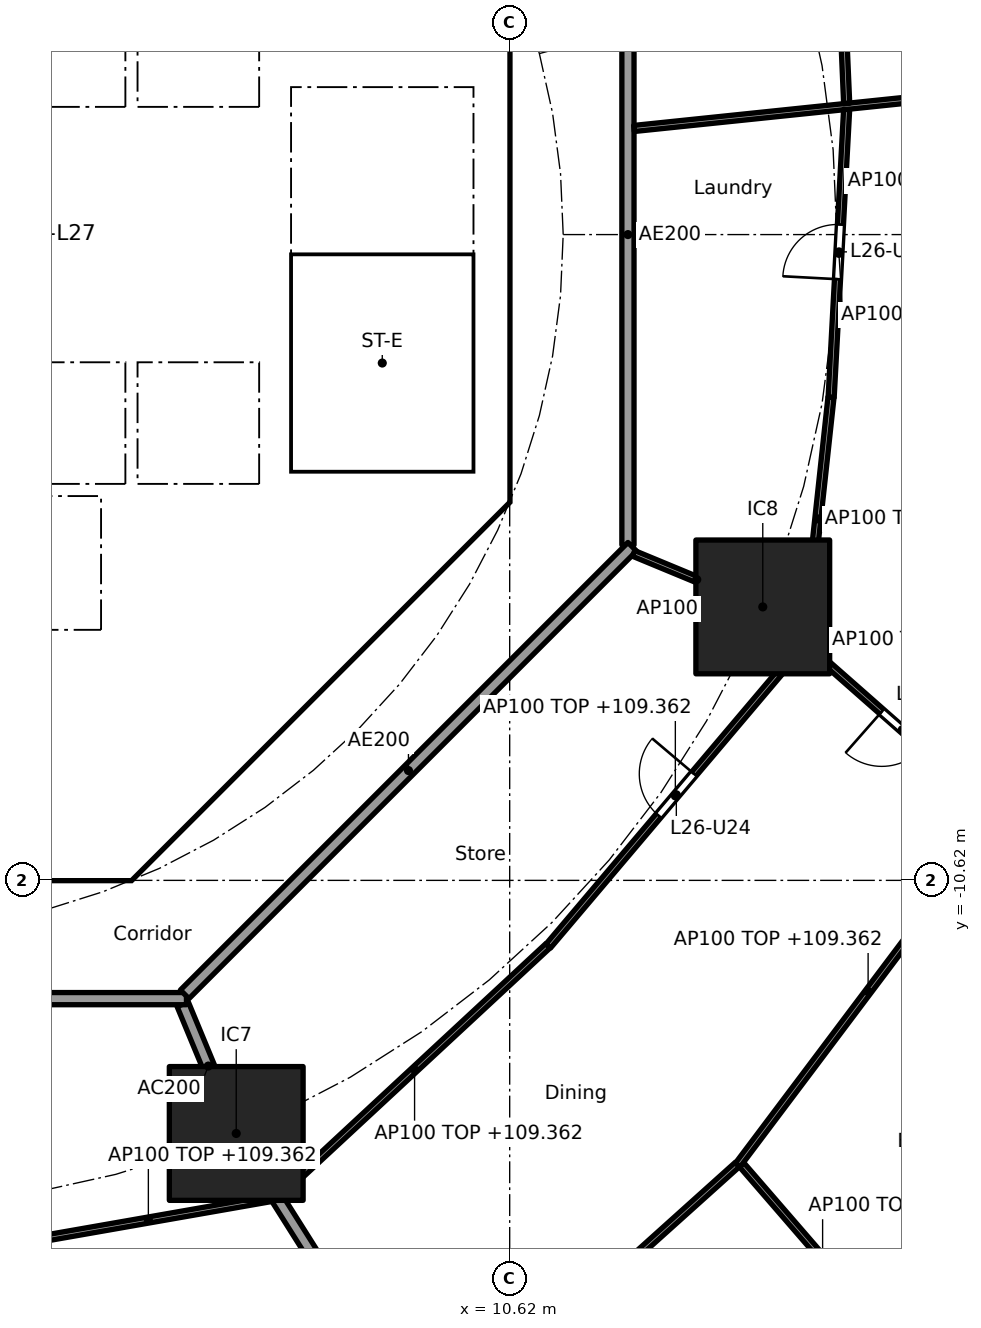
"""IFC4 building model, lengths in metres.
Left out: names, types, materials, properties, quantities, classifications, styles, units other than length and angle.
Written with IfcOpenShell. Run it as: python <this file> out.ifc"""

import sys

from ifc_helpers import new_model, si_unit, direction, frame, frame_2d, origin, origin_2d, place, context, subcontext, project, spatial, polyline, rectangle, outline, extrude, element, fill, save


model = new_model("IFC4")
c1 = context("Model", 3, precision=1e-05, world=origin(), true_north=direction((0.0, 1.0)))
c2 = subcontext(c1, "Body", "Model", "MODEL_VIEW")
j1 = project(units=[si_unit("LENGTHUNIT", "METRE"), si_unit("PLANEANGLEUNIT", "RADIAN")], contexts=[c1])
p1 = place(None, origin())
s1 = spatial("IfcSite", under=j1, at=p1, CompositionType="ELEMENT")
p2 = place(p1, origin())
s2 = spatial("IfcBuilding", under=s1, at=p2, CompositionType="ELEMENT")
p3 = place(p2, frame((0.0, 0.0, 106.6)))
s3 = spatial("IfcBuildingStorey", under=s2, at=p3, CompositionType="ELEMENT", Elevation=106.6)
for number, where, z_axis, x_axis in (
    (1, (6.123, -14.782, 0.0), (0.0, 0.0, 1.0), (1.0, 0.0, 0.0)),
    (2, (14.782, -6.123, 0.0), (0.0, 0.0, 1.0), (1.0, 0.0, 0.0)),
):
    element("IfcColumn", number, at=place(p3, frame(where, z_axis=z_axis, x_axis=x_axis)), inside=s3, PredefinedType="COLUMN", context=c2, shape_type="SweptSolid", body=[
        extrude(rectangle(XDim=2.2, YDim=2.2, at=origin_2d()), origin(), (0.0, 0.0, 1.0), 3.7),
    ])
p4 = place(p3, frame((4.613, -9.988, 0.0), z_axis=(0.0, 0.0, 1.0), x_axis=(0.707106781187, 0.707106781187, 0.0)))
e3 = element("IfcWall", 3, at=p4, inside=s3, PredefinedType="SHEAR", context=c2, shape_type="SweptSolid", body=[
    extrude(rectangle(XDim=7.602, YDim=0.6, at=frame_2d((3.801, 0.0))), origin(), (0.0, 0.0, 1.0), 3.44),
])
p5 = place(p4, frame((3.201, 0.0, 0.0)))
e4 = element("IfcOpeningElement", 4, at=p5, cuts=e3, PredefinedType="OPENING", context=c2, shape_type="SweptSolid", body=[
    extrude(rectangle(XDim=1.2, YDim=2.1, at=frame_2d((0.6, 1.05))), frame((0.0, 0.31, 0.0), z_axis=(0.0, -1.0, 0.0), x_axis=(1.0, 0.0, 0.0)), (0.0, 0.0, 1.0), 0.62),
])
p6 = place(p3, frame((-6.7, 2.0, 0.0), z_axis=(0.0, 0.0, 1.0), x_axis=(1.0, 0.0, 0.0)))
e5 = element("IfcWall", 5, at=p6, inside=s3, PredefinedType="SOLIDWALL", context=c2, shape_type="SweptSolid", body=[
    extrude(rectangle(XDim=13.4, YDim=0.2, at=frame_2d((6.7, 0.0))), origin(), (0.0, 0.0, 1.0), 3.44),
])
p7 = place(p6, frame((0.65, 0.0, 0.0)))
e6 = element("IfcOpeningElement", 6, at=p7, cuts=e5, PredefinedType="OPENING", context=c2, shape_type="SweptSolid", body=[
    extrude(rectangle(XDim=1.1, YDim=2.1, at=frame_2d((0.55, 1.05))), frame((0.0, 0.11, 0.0), z_axis=(0.0, -1.0, 0.0), x_axis=(1.0, 0.0, 0.0)), (0.0, 0.0, 1.0), 0.22),
])
p8 = place(p6, frame((2.85, 0.0, 0.0)))
e7 = element("IfcOpeningElement", 7, at=p8, cuts=e5, PredefinedType="OPENING", context=c2, shape_type="SweptSolid", body=[
    extrude(rectangle(XDim=1.1, YDim=2.1, at=frame_2d((0.55, 1.05))), frame((0.0, 0.11, 0.0), z_axis=(0.0, -1.0, 0.0), x_axis=(1.0, 0.0, 0.0)), (0.0, 0.0, 1.0), 0.22),
])
p9 = place(p6, frame((5.05, 0.0, 0.0)))
e8 = element("IfcOpeningElement", 8, at=p9, cuts=e5, PredefinedType="OPENING", context=c2, shape_type="SweptSolid", body=[
    extrude(rectangle(XDim=1.1, YDim=2.1, at=frame_2d((0.55, 1.05))), frame((0.0, 0.11, 0.0), z_axis=(0.0, -1.0, 0.0), x_axis=(1.0, 0.0, 0.0)), (0.0, 0.0, 1.0), 0.22),
])
p10 = place(p3, frame((4.0, -10.025, 0.0), z_axis=(0.0, 0.0, 1.0), x_axis=(0.0, 1.0, 0.0)))
e9 = element("IfcWall", 9, at=p10, inside=s3, PredefinedType="SOLIDWALL", context=c2, shape_type="SweptSolid", body=[
    extrude(rectangle(XDim=3.0, YDim=0.2, at=frame_2d((1.5, 0.0))), origin(), (0.0, 0.0, 1.0), 3.44),
])
p11 = place(p10, frame((0.975, 0.0, 0.0)))
e10 = element("IfcOpeningElement", 10, at=p11, cuts=e9, PredefinedType="OPENING", context=c2, shape_type="SweptSolid", body=[
    extrude(rectangle(XDim=1.1, YDim=2.1, at=frame_2d((0.55, 1.05))), frame((0.0, 0.11, 0.0), z_axis=(0.0, -1.0, 0.0), x_axis=(1.0, 0.0, 0.0)), (0.0, 0.0, 1.0), 0.22),
])
p12 = place(p3, frame((4.0, -6.5, 0.0), z_axis=(0.0, 0.0, 1.0), x_axis=(0.0, 1.0, 0.0)))
e11 = element("IfcWall", 11, at=p12, inside=s3, PredefinedType="SOLIDWALL", context=c2, shape_type="SweptSolid", body=[
    extrude(rectangle(XDim=2.2, YDim=0.2, at=frame_2d((1.1, 0.0))), origin(), (0.0, 0.0, 1.0), 3.44),
])
p13 = place(p12, frame((0.55, 0.0, 0.0)))
e12 = element("IfcOpeningElement", 12, at=p13, cuts=e11, PredefinedType="OPENING", context=c2, shape_type="SweptSolid", body=[
    extrude(rectangle(XDim=1.1, YDim=2.1, at=frame_2d((0.55, 1.05))), frame((0.0, 0.11, 0.0), z_axis=(0.0, -1.0, 0.0), x_axis=(1.0, 0.0, 0.0)), (0.0, 0.0, 1.0), 0.22),
])
p14 = place(p3, frame((-6.7, -2.0, 0.0), z_axis=(0.0, 0.0, 1.0), x_axis=(1.0, 0.0, 0.0)))
e13 = element("IfcWall", 13, at=p14, inside=s3, PredefinedType="SOLIDWALL", context=c2, shape_type="SweptSolid", body=[
    extrude(rectangle(XDim=13.4, YDim=0.2, at=frame_2d((6.7, 0.0))), origin(), (0.0, 0.0, 1.0), 3.44),
])
p15 = place(p14, frame((0.65, 0.0, 0.0)))
e14 = element("IfcOpeningElement", 14, at=p15, cuts=e13, PredefinedType="OPENING", context=c2, shape_type="SweptSolid", body=[
    extrude(rectangle(XDim=1.1, YDim=2.1, at=frame_2d((0.55, 1.05))), frame((0.0, 0.11, 0.0), z_axis=(0.0, -1.0, 0.0), x_axis=(1.0, 0.0, 0.0)), (0.0, 0.0, 1.0), 0.22),
])
p16 = place(p14, frame((2.85, 0.0, 0.0)))
e15 = element("IfcOpeningElement", 15, at=p16, cuts=e13, PredefinedType="OPENING", context=c2, shape_type="SweptSolid", body=[
    extrude(rectangle(XDim=1.1, YDim=2.1, at=frame_2d((0.55, 1.05))), frame((0.0, 0.11, 0.0), z_axis=(0.0, -1.0, 0.0), x_axis=(1.0, 0.0, 0.0)), (0.0, 0.0, 1.0), 0.22),
])
p17 = place(p3, origin())
e16 = element("IfcWall", 16, at=p17, inside=s3, PredefinedType="SHEAR", context=c2, shape_type="SweptSolid", body=[
    extrude(outline(polyline([(-4.152, -10.025), (4.152, -10.025), (4.401, -9.776), (4.825, -10.2), (4.401, -10.625), (-4.401, -10.625), (-4.825, -10.2), (-4.401, -9.776), (-4.152, -10.025)])), origin(), (0.0, 0.0, 1.0), 3.44),
])
p18 = place(p3, origin())
e17 = element("IfcWall", 17, at=p18, inside=s3, PredefinedType="SHEAR", context=c2, shape_type="SweptSolid", body=[
    extrude(outline(polyline([(9.776, -4.401), (10.025, -4.152), (10.025, -3.801), (10.025, 4.152), (9.776, 4.401), (10.2, 4.825), (10.625, 4.401), (10.625, -4.401), (10.2, -4.825), (9.776, -4.401)])), origin(), (0.0, 0.0, 1.0), 3.44),
])
p19 = place(p3, origin())
e18 = element("IfcWall", 18, at=p19, inside=s3, PredefinedType="SOLIDWALL", context=c2, shape_type="SweptSolid", body=[
    extrude(outline(polyline([(-6.7, -2.1), (-6.5, -2.1), (-6.5, -4.1), (-4.5, -4.1), (-4.5, -2.1), (-4.3, -2.1), (-4.3, -4.1), (-2.3, -4.1), (-2.3, -2.1), (-2.1, -2.1), (-2.1, -4.1), (-0.1, -4.1), (-0.1, -2.1), (0.1, -2.1), (0.1, -4.1), (2.1, -4.1), (2.1, -2.1), (2.3, -2.1), (2.3, -4.1), (4.3, -4.1), (4.3, -2.1), (4.5, -2.1), (4.5, -4.1), (6.5, -4.1), (6.5, -2.1), (6.7, -2.1), (6.7, -4.3), (-6.7, -4.3), (-6.7, -2.1)])), origin(), (0.0, 0.0, 1.0), 3.44),
])
p20 = place(p3, origin())
e19 = element("IfcWall", 19, at=p20, inside=s3, PredefinedType="SOLIDWALL", context=c2, shape_type="SweptSolid", body=[
    extrude(outline(polyline([(-6.5, 2.1), (-6.7, 2.1), (-6.7, 4.3), (6.7, 4.3), (6.7, 2.1), (6.5, 2.1), (6.5, 4.1), (4.5, 4.1), (4.5, 2.1), (4.3, 2.1), (4.3, 4.1), (2.3, 4.1), (2.3, 2.1), (2.1, 2.1), (2.1, 4.1), (0.1, 4.1), (0.1, 2.1), (-0.1, 2.1), (-0.1, 4.1), (-2.1, 4.1), (-2.1, 2.1), (-2.3, 2.1), (-2.3, 4.1), (-4.3, 4.1), (-4.3, 2.1), (-4.5, 2.1), (-4.5, 4.1), (-6.5, 4.1), (-6.5, 2.1)])), origin(), (0.0, 0.0, 1.0), 3.44),
])
p21 = place(p3, origin())
e20 = element("IfcWall", 20, at=p21, inside=s3, PredefinedType="SOLIDWALL", context=c2, shape_type="SweptSolid", body=[
    extrude(outline(polyline([(4.1, -7.025), (-4.1, -7.025), (-4.1, -6.5), (4.1, -6.5), (4.1, -7.025)])), origin(), (0.0, 0.0, 1.0), 3.44),
])
p22 = place(p3, origin())
e21 = element("IfcWall", 21, at=p22, inside=s3, PredefinedType="SOLIDWALL", context=c2, shape_type="SweptSolid", body=[
    extrude(outline(polyline([(7.025, -3.9), (6.7, -3.9), (6.7, 3.9), (7.025, 3.9), (7.025, -3.9)])), origin(), (0.0, 0.0, 1.0), 3.44),
])
p23 = place(p3, origin())
e22 = element("IfcWall", 22, at=p23, inside=s3, PredefinedType="SOLIDWALL", context=c2, shape_type="SweptSolid", body=[
    extrude(outline(polyline([(10.025, -4.1), (6.7, -4.1), (6.7, -3.9), (10.025, -3.9), (10.025, -4.1)])), origin(), (0.0, 0.0, 1.0), 3.44),
])
p24 = place(p3, frame((5.243, -12.657, 0.0), z_axis=(0.0, 0.0, 1.0), x_axis=(0.382747093259, -0.923853160736, 0.0)))
e23 = element("IfcWall", 23, at=p24, inside=s3, PredefinedType="PARTITIONING", context=c2, shape_type="SweptSolid", body=[
    extrude(rectangle(XDim=2.2, YDim=0.2, at=frame_2d((1.1, 0.0))), origin(), (0.0, 0.0, 1.0), 3.44),
])
p25 = place(p3, frame((6.15, -14.824, 0.0), z_axis=(0.0, 0.0, 1.0), x_axis=(0.533492589682, -0.845804739142, 0.0)))
e24 = element("IfcWall", 24, at=p25, inside=s3, PredefinedType="PARTITIONING", context=c2, shape_type="SweptSolid", body=[
    extrude(rectangle(XDim=10.006, YDim=0.2, at=frame_2d((5.003, 0.0))), origin(), (0.0, 0.0, 1.0), 2.762),
])
p26 = place(p3, frame((12.565, -5.104, 0.0), z_axis=(0.0, 0.0, 1.0), x_axis=(0.0, 1.0, 0.0)))
e25 = element("IfcWall", 25, at=p26, inside=s3, PredefinedType="PARTITIONING", context=c2, shape_type="SweptSolid", body=[
    extrude(rectangle(XDim=10.209, YDim=0.2, at=frame_2d((5.104, 0.0))), origin(), (0.0, 0.0, 1.0), 3.44),
])
p27 = place(p3, frame((-5.104, -12.565, 0.0), z_axis=(0.0, 0.0, 1.0), x_axis=(1.0, 0.0, 0.0)))
e26 = element("IfcWall", 26, at=p27, inside=s3, PredefinedType="PARTITIONING", context=c2, shape_type="SweptSolid", body=[
    extrude(rectangle(XDim=10.409, YDim=0.2, at=frame_2d((5.205, 0.0))), origin(), (0.0, 0.0, 1.0), 3.44),
])
p28 = place(p27, frame((2.87, 0.0, 0.0)))
e27 = element("IfcOpeningElement", 27, at=p28, cuts=e26, PredefinedType="OPENING", context=c2, shape_type="SweptSolid", body=[
    extrude(rectangle(XDim=1.0, YDim=2.1, at=frame_2d((0.5, 1.05))), frame((0.0, 0.11, 0.0), z_axis=(0.0, -1.0, 0.0), x_axis=(1.0, 0.0, 0.0)), (0.0, 0.0, 1.0), 0.22),
])
p29 = place(p3, frame((5.275, -12.494, 0.0), z_axis=(0.0, 0.0, 1.0), x_axis=(0.707106781187, 0.707106781187, 0.0)))
e28 = element("IfcWall", 28, at=p29, inside=s3, PredefinedType="PARTITIONING", context=c2, shape_type="SweptSolid", body=[
    extrude(rectangle(XDim=10.409, YDim=0.2, at=frame_2d((5.205, 0.0))), origin(), (0.0, 0.0, 1.0), 3.44),
])
p30 = place(p3, frame((12.664, 1.745, 0.0), z_axis=(0.0, 0.0, 1.0), x_axis=(0.994662790212, 0.103179134358, 0.0)))
e29 = element("IfcWall", 29, at=p30, inside=s3, PredefinedType="PARTITIONING", context=c2, shape_type="SweptSolid", body=[
    extrude(rectangle(XDim=12.257, YDim=0.1, at=frame_2d((6.128, 0.0))), origin(), (0.0, 0.0, 1.0), 2.687),
])
p31 = place(p30, frame((5.414, 0.0, 0.0)))
e30 = element("IfcOpeningElement", 30, at=p31, cuts=e29, PredefinedType="OPENING", context=c2, shape_type="SweptSolid", body=[
    extrude(rectangle(XDim=0.9, YDim=2.1, at=frame_2d((0.45, 1.05))), frame((0.0, 0.06, 0.0), z_axis=(0.0, -1.0, 0.0), x_axis=(1.0, 0.0, 0.0)), (0.0, 0.0, 1.0), 0.12),
])
p32 = place(p3, frame((16.162, 2.158, 0.0), z_axis=(0.0, 0.0, 1.0), x_axis=(-0.043120653248, 0.999069872063, 0.0)))
e31 = element("IfcWall", 31, at=p32, inside=s3, PredefinedType="PARTITIONING", context=c2, shape_type="SweptSolid", body=[
    extrude(rectangle(XDim=4.518, YDim=0.1, at=frame_2d((2.259, 0.0))), origin(), (0.0, 0.0, 1.0), 3.44),
])
p33 = place(p32, frame((1.809, 0.0, 0.0)))
e32 = element("IfcOpeningElement", 32, at=p33, cuts=e31, PredefinedType="OPENING", context=c2, shape_type="SweptSolid", body=[
    extrude(rectangle(XDim=0.9, YDim=2.1, at=frame_2d((0.45, 1.05))), frame((0.0, 0.06, 0.0), z_axis=(0.0, -1.0, 0.0), x_axis=(1.0, 0.0, 0.0)), (0.0, 0.0, 1.0), 0.12),
])
p34 = place(p3, frame((16.161, 2.058, 0.0), z_axis=(0.0, 0.0, 1.0), x_axis=(-0.053696394729, -0.998557307916, 0.0)))
e33 = element("IfcWall", 33, at=p34, inside=s3, PredefinedType="PARTITIONING", context=c2, shape_type="SweptSolid", body=[
    extrude(rectangle(XDim=4.742, YDim=0.1, at=frame_2d((2.371, 0.0))), origin(), (0.0, 0.0, 1.0), 2.762),
])
p35 = place(p34, frame((1.896, 0.0, 0.0)))
e34 = element("IfcOpeningElement", 34, at=p35, cuts=e33, PredefinedType="OPENING", context=c2, shape_type="SweptSolid", body=[
    extrude(rectangle(XDim=0.9, YDim=2.1, at=frame_2d((0.45, 1.05))), frame((0.0, 0.06, 0.0), z_axis=(0.0, -1.0, 0.0), x_axis=(1.0, 0.0, 0.0)), (0.0, 0.0, 1.0), 0.12),
])
p36 = place(p3, frame((2.667, -16.558, 0.0), z_axis=(0.0, 0.0, 1.0), x_axis=(0.984996445375, 0.172574629069, 0.0)))
e35 = element("IfcWall", 35, at=p36, inside=s3, PredefinedType="PARTITIONING", context=c2, shape_type="SweptSolid", body=[
    extrude(rectangle(XDim=4.084, YDim=0.1, at=frame_2d((2.042, 0.0))), origin(), (0.0, 0.0, 1.0), 2.762),
])
p37 = place(p3, frame((6.861, -15.768, 0.0), z_axis=(0.0, 0.0, 1.0), x_axis=(0.733011256509, 0.680216508056, 0.0)))
e36 = element("IfcWall", 36, at=p37, inside=s3, PredefinedType="PARTITIONING", context=c2, shape_type="SweptSolid", body=[
    extrude(rectangle(XDim=5.989, YDim=0.1, at=frame_2d((2.994, 0.0))), origin(), (0.0, 0.0, 1.0), 2.762),
])
p38 = place(p3, frame((9.384, -19.768, 0.0), z_axis=(0.0, 0.0, 1.0), x_axis=(0.74387407395, 0.668319805262, 0.0)))
e37 = element("IfcWall", 37, at=p38, inside=s3, PredefinedType="PARTITIONING", context=c2, shape_type="SweptSolid", body=[
    extrude(rectangle(XDim=6.695, YDim=0.1, at=frame_2d((3.348, 0.0))), origin(), (0.0, 0.0, 1.0), 2.762),
])
p39 = place(p38, frame((2.898, 0.0, 0.0)))
e38 = element("IfcOpeningElement", 38, at=p39, cuts=e37, PredefinedType="OPENING", context=c2, shape_type="SweptSolid", body=[
    extrude(rectangle(XDim=0.9, YDim=2.1, at=frame_2d((0.45, 1.05))), frame((0.0, 0.06, 0.0), z_axis=(0.0, -1.0, 0.0), x_axis=(1.0, 0.0, 0.0)), (0.0, 0.0, 1.0), 0.12),
])
p40 = place(p3, frame((11.255, -11.699, 0.0), z_axis=(0.0, 0.0, 1.0), x_axis=(0.64610637779, 0.763247370503, 0.0)))
e39 = element("IfcWall", 39, at=p40, inside=s3, PredefinedType="PARTITIONING", context=c2, shape_type="SweptSolid", body=[
    extrude(rectangle(XDim=6.467, YDim=0.1, at=frame_2d((3.233, 0.0))), origin(), (0.0, 0.0, 1.0), 2.762),
])
p41 = place(p40, frame((2.809, 0.0, 0.0)))
e40 = element("IfcOpeningElement", 40, at=p41, cuts=e39, PredefinedType="OPENING", context=c2, shape_type="SweptSolid", body=[
    extrude(rectangle(XDim=0.9, YDim=2.1, at=frame_2d((0.45, 1.05))), frame((0.0, 0.06, 0.0), z_axis=(0.0, -1.0, 0.0), x_axis=(1.0, 0.0, 0.0)), (0.0, 0.0, 1.0), 0.12),
])
p42 = place(p3, frame((14.435, -15.297, 0.0), z_axis=(0.0, 0.0, 1.0), x_axis=(0.654405107766, -0.756144136345, 0.0)))
e41 = element("IfcWall", 41, at=p42, inside=s3, PredefinedType="PARTITIONING", context=c2, shape_type="SweptSolid", body=[
    extrude(rectangle(XDim=4.07, YDim=0.1, at=frame_2d((2.035, 0.0))), origin(), (0.0, 0.0, 1.0), 2.762),
])
p43 = place(p3, frame((14.372, -15.3, 0.0), z_axis=(0.0, 0.0, 1.0), x_axis=(0.600996629562, 0.79925155693, 0.0)))
e42 = element("IfcWall", 42, at=p43, inside=s3, PredefinedType="PARTITIONING", context=c2, shape_type="SweptSolid", body=[
    extrude(rectangle(XDim=7.13, YDim=0.1, at=frame_2d((3.565, 0.0))), origin(), (0.0, 0.0, 1.0), 2.762),
])
p44 = place(p3, frame((12.657, -5.243, 0.0), z_axis=(0.0, 0.0, 1.0), x_axis=(0.923848837015, -0.382757529444, 0.0)))
e43 = element("IfcWall", 43, at=p44, inside=s3, PredefinedType="PARTITIONING", context=c2, shape_type="SweptSolid", body=[
    extrude(rectangle(XDim=2.25, YDim=0.1, at=frame_2d((1.125, 0.0))), origin(), (0.0, 0.0, 1.0), 3.44),
])
p45 = place(p3, frame((14.82, -6.156, 0.0), z_axis=(0.0, 0.0, 1.0), x_axis=(0.750582231659, -0.660777052808, 0.0)))
e44 = element("IfcWall", 44, at=p45, inside=s3, PredefinedType="PARTITIONING", context=c2, shape_type="SweptSolid", body=[
    extrude(rectangle(XDim=8.781, YDim=0.1, at=frame_2d((4.391, 0.0))), origin(), (0.0, 0.0, 1.0), 3.44),
])
p46 = place(p45, frame((2.557, 0.0, 0.0)))
e45 = element("IfcOpeningElement", 45, at=p46, cuts=e44, PredefinedType="OPENING", context=c2, shape_type="SweptSolid", body=[
    extrude(rectangle(XDim=0.9, YDim=2.1, at=frame_2d((0.45, 1.05))), frame((0.0, 0.06, 0.0), z_axis=(0.0, -1.0, 0.0), x_axis=(1.0, 0.0, 0.0)), (0.0, 0.0, 1.0), 0.12),
])
p47 = place(p45, frame((6.517, 0.0, 0.0)))
e46 = element("IfcOpeningElement", 46, at=p47, cuts=e44, PredefinedType="OPENING", context=c2, shape_type="SweptSolid", body=[
    extrude(rectangle(XDim=0.9, YDim=2.1, at=frame_2d((0.45, 1.05))), frame((0.0, 0.06, 0.0), z_axis=(0.0, -1.0, 0.0), x_axis=(1.0, 0.0, 0.0)), (0.0, 0.0, 1.0), 0.12),
])
p48 = place(p3, frame((15.471, -6.675, 0.0), z_axis=(0.0, 0.0, 1.0), x_axis=(0.107572661837, 0.994197225114, 0.0)))
e47 = element("IfcWall", 47, at=p48, inside=s3, PredefinedType="PARTITIONING", context=c2, shape_type="SweptSolid", body=[
    extrude(rectangle(XDim=4.022, YDim=0.1, at=frame_2d((2.011, 0.0))), origin(), (0.0, 0.0, 1.0), 2.762),
])
p49 = place(p13, origin())
e48 = element("IfcDoor", 48, at=p49, inside=s3, OperationType="DOUBLE_DOOR_SLIDING", PredefinedType="DOOR", context=c2, shape_type="SweptSolid", body=[
    extrude(rectangle(XDim=1.1, YDim=2.1, at=frame_2d((0.55, 1.05))), frame((0.0, 0.025, 0.0), z_axis=(0.0, -1.0, 0.0), x_axis=(1.0, 0.0, 0.0)), (0.0, 0.0, 1.0), 0.05),
])
fill(e12, e48)
p50 = place(p11, origin())
e49 = element("IfcDoor", 49, at=p50, inside=s3, OperationType="SINGLE_SWING_RIGHT", PredefinedType="DOOR", context=c2, shape_type="SweptSolid", body=[
    extrude(rectangle(XDim=1.1, YDim=2.1, at=frame_2d((0.55, 1.05))), frame((0.0, 0.025, 0.0), z_axis=(0.0, -1.0, 0.0), x_axis=(1.0, 0.0, 0.0)), (0.0, 0.0, 1.0), 0.05),
])
fill(e10, e49)
p51 = place(p5, origin())
e50 = element("IfcDoor", 50, at=p51, inside=s3, OperationType="SINGLE_SWING_RIGHT", PredefinedType="DOOR", context=c2, shape_type="SweptSolid", body=[
    extrude(rectangle(XDim=1.2, YDim=2.1, at=frame_2d((0.6, 1.05))), frame((0.0, 0.025, 0.0), z_axis=(0.0, -1.0, 0.0), x_axis=(1.0, 0.0, 0.0)), (0.0, 0.0, 1.0), 0.05),
])
fill(e4, e50)
p52 = place(p35, frame((0.9, 0.0, 0.0), x_axis=(-1.0, 0.0, 0.0)))
e51 = element("IfcDoor", 51, at=p52, inside=s3, OperationType="SINGLE_SWING_LEFT", PredefinedType="DOOR", context=c2, shape_type="SweptSolid", body=[
    extrude(rectangle(XDim=0.9, YDim=2.1, at=frame_2d((0.45, 1.05))), frame((0.0, 0.025, 0.0), z_axis=(0.0, -1.0, 0.0), x_axis=(1.0, 0.0, 0.0)), (0.0, 0.0, 1.0), 0.05),
])
fill(e34, e51)
p53 = place(p46, frame((0.9, 0.0, 0.0), x_axis=(-1.0, 0.0, 0.0)))
e52 = element("IfcDoor", 52, at=p53, inside=s3, OperationType="SINGLE_SWING_RIGHT", PredefinedType="DOOR", context=c2, shape_type="SweptSolid", body=[
    extrude(rectangle(XDim=0.9, YDim=2.1, at=frame_2d((0.45, 1.05))), frame((0.0, 0.025, 0.0), z_axis=(0.0, -1.0, 0.0), x_axis=(1.0, 0.0, 0.0)), (0.0, 0.0, 1.0), 0.05),
])
fill(e45, e52)
p54 = place(p41, origin())
e53 = element("IfcDoor", 53, at=p54, inside=s3, OperationType="SINGLE_SWING_RIGHT", PredefinedType="DOOR", context=c2, shape_type="SweptSolid", body=[
    extrude(rectangle(XDim=0.9, YDim=2.1, at=frame_2d((0.45, 1.05))), frame((0.0, 0.025, 0.0), z_axis=(0.0, -1.0, 0.0), x_axis=(1.0, 0.0, 0.0)), (0.0, 0.0, 1.0), 0.05),
])
fill(e40, e53)
save(model, sys.argv[1])
